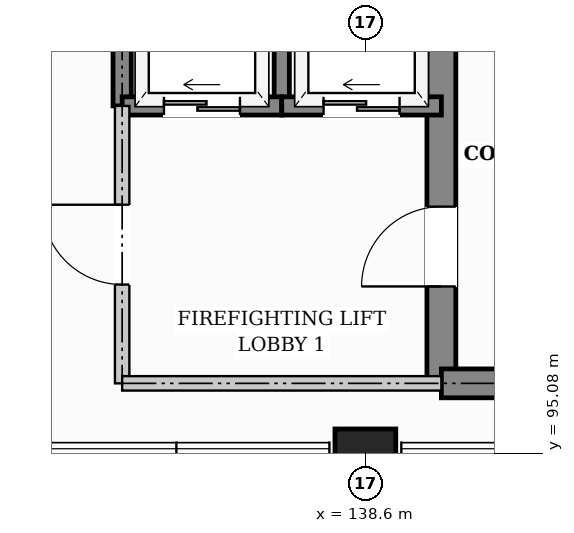
"""IFC4 building model, lengths in metres.
Left out: names, types, materials, properties, quantities, classifications, styles, units other than length and angle.
Written with IfcOpenShell. Run it as: python <this file> out.ifc"""

import sys

from ifc_helpers import new_model, si_unit, direction, frame, frame_2d, origin, origin_2d, place, context, subcontext, project, spatial, rectangle, extrude, element, fill, save


model = new_model("IFC4")
c1 = context("Model", 3, precision=1e-05, world=origin(), true_north=direction((0.0, 1.0)))
c2 = subcontext(c1, "Body", "Model", "MODEL_VIEW")
j1 = project(units=[si_unit("LENGTHUNIT", "METRE"), si_unit("PLANEANGLEUNIT", "RADIAN")], contexts=[c1])
p1 = place(None, origin())
s1 = spatial("IfcSite", under=j1, at=p1, CompositionType="ELEMENT")
p2 = place(p1, origin())
s2 = spatial("IfcBuilding", under=s1, at=p2, CompositionType="ELEMENT")
p3 = place(p2, frame((0.0, 0.0, 9.6)))
s3 = spatial("IfcBuildingStorey", under=s2, at=p3, CompositionType="ELEMENT", Elevation=9.6)
p4 = place(p3, frame((138.6, 95.0, 0.0), z_axis=(0.0, 0.0, 1.0), x_axis=(1.0, 0.0, 0.0)))
e1 = element("IfcColumn", 1, at=p4, inside=s3, PredefinedType="COLUMN", context=c2, shape_type="SweptSolid", body=[
    extrude(rectangle(XDim=0.8, YDim=0.8, at=origin_2d()), origin(), (0.0, 0.0, 1.0), 3.6),
])
p5 = place(p3, frame((139.6, 96.0, 0.0), z_axis=(0.0, 0.0, 1.0), x_axis=(0.0, 1.0, 0.0)))
e2 = element("IfcWall", 2, at=p5, inside=s3, PredefinedType="SHEAR", context=c2, shape_type="SweptSolid", body=[
    extrude(rectangle(XDim=6.0, YDim=0.38, at=frame_2d((3.0, 0.0))), origin(), (0.0, 0.0, 1.0), 3.32),
])
p6 = place(p5, frame((1.275, 0.0, 0.0)))
e3 = element("IfcOpeningElement", 3, at=p6, cuts=e2, PredefinedType="OPENING", context=c2, shape_type="SweptSolid", body=[
    extrude(rectangle(XDim=1.05, YDim=2.15, at=frame_2d((0.525, 1.075))), frame((0.0, 0.2, 0.0), z_axis=(0.0, -1.0, 0.0), x_axis=(1.0, 0.0, 0.0)), (0.0, 0.0, 1.0), 0.4),
])
p7 = place(p3, frame((139.6, 96.0, 0.0), z_axis=(0.0, 0.0, 1.0), x_axis=(1.0, 0.0, 0.0)))
e4 = element("IfcWall", 4, at=p7, inside=s3, PredefinedType="SHEAR", context=c2, shape_type="SweptSolid", body=[
    extrude(rectangle(XDim=7.0, YDim=0.38, at=frame_2d((3.5, 0.0))), origin(), (0.0, 0.0, 1.0), 3.32),
])
p8 = place(p3, frame((135.4, 99.65, 0.0), z_axis=(0.0, 0.0, 1.0), x_axis=(0.0, 1.0, 0.0)))
e5 = element("IfcWall", 5, at=p8, inside=s3, PredefinedType="SHEAR", context=c2, shape_type="SweptSolid", body=[
    extrude(rectangle(XDim=2.35, YDim=0.24, at=frame_2d((1.175, 0.0))), origin(), (0.0, 0.0, 1.0), 3.32),
])
p9 = place(p3, frame((137.5, 99.65, 0.0), z_axis=(0.0, 0.0, 1.0), x_axis=(0.0, 1.0, 0.0)))
e6 = element("IfcWall", 6, at=p9, inside=s3, PredefinedType="SHEAR", context=c2, shape_type="SweptSolid", body=[
    extrude(rectangle(XDim=2.35, YDim=0.2, at=frame_2d((1.175, 0.0))), origin(), (0.0, 0.0, 1.0), 3.32),
])
p10 = place(p3, frame((135.4, 99.65, 0.0), z_axis=(0.0, 0.0, 1.0), x_axis=(1.0, 0.0, 0.0)))
e7 = element("IfcWall", 7, at=p10, inside=s3, PredefinedType="SHEAR", context=c2, shape_type="SweptSolid", body=[
    extrude(rectangle(XDim=2.1, YDim=0.24, at=frame_2d((1.05, 0.0))), origin(), (0.0, 0.0, 1.0), 3.32),
])
p11 = place(p10, frame((0.55, 0.0, 0.0)))
e8 = element("IfcOpeningElement", 8, at=p11, cuts=e7, PredefinedType="OPENING", context=c2, shape_type="SweptSolid", body=[
    extrude(rectangle(XDim=1.0, YDim=2.1, at=frame_2d((0.5, 1.05))), frame((0.0, 0.13, 0.0), z_axis=(0.0, -1.0, 0.0), x_axis=(1.0, 0.0, 0.0)), (0.0, 0.0, 1.0), 0.26),
])
p12 = place(p3, frame((137.5, 99.65, 0.0), z_axis=(0.0, 0.0, 1.0), x_axis=(1.0, 0.0, 0.0)))
e9 = element("IfcWall", 9, at=p12, inside=s3, PredefinedType="SHEAR", context=c2, shape_type="SweptSolid", body=[
    extrude(rectangle(XDim=2.1, YDim=0.24, at=frame_2d((1.05, 0.0))), origin(), (0.0, 0.0, 1.0), 3.32),
])
p13 = place(p12, frame((0.55, 0.0, 0.0)))
e10 = element("IfcOpeningElement", 10, at=p13, cuts=e9, PredefinedType="OPENING", context=c2, shape_type="SweptSolid", body=[
    extrude(rectangle(XDim=1.0, YDim=2.1, at=frame_2d((0.5, 1.05))), frame((0.0, 0.13, 0.0), z_axis=(0.0, -1.0, 0.0), x_axis=(1.0, 0.0, 0.0)), (0.0, 0.0, 1.0), 0.26),
])
p14 = place(p3, frame((135.4, 96.0, 0.0), z_axis=(0.0, 0.0, 1.0), x_axis=(0.0, 1.0, 0.0)))
e11 = element("IfcWall", 11, at=p14, inside=s3, PredefinedType="PARTITIONING", context=c2, shape_type="SweptSolid", body=[
    extrude(rectangle(XDim=3.65, YDim=0.19, at=frame_2d((1.825, 0.0))), origin(), (0.0, 0.0, 1.0), 3.32),
])
p15 = place(p14, frame((1.3, 0.0, 0.0)))
e12 = element("IfcOpeningElement", 12, at=p15, cuts=e11, PredefinedType="OPENING", context=c2, shape_type="SweptSolid", body=[
    extrude(rectangle(XDim=1.05, YDim=2.15, at=frame_2d((0.525, 1.075))), frame((0.0, 0.105, 0.0), z_axis=(0.0, -1.0, 0.0), x_axis=(1.0, 0.0, 0.0)), (0.0, 0.0, 1.0), 0.21),
])
p16 = place(p3, frame((135.4, 96.0, 0.0), z_axis=(0.0, 0.0, 1.0), x_axis=(1.0, 0.0, 0.0)))
e13 = element("IfcWall", 13, at=p16, inside=s3, PredefinedType="PARTITIONING", context=c2, shape_type="SweptSolid", body=[
    extrude(rectangle(XDim=4.2, YDim=0.19, at=frame_2d((2.1, 0.0))), origin(), (0.0, 0.0, 1.0), 3.32),
])
p17 = place(p6, origin())
e14 = element("IfcDoor", 14, at=p17, inside=s3, OperationType="SINGLE_SWING_LEFT", PredefinedType="DOOR", context=c2, shape_type="SweptSolid", body=[
    extrude(rectangle(XDim=1.05, YDim=2.15, at=frame_2d((0.525, 1.075))), frame((0.0, 0.025, 0.0), z_axis=(0.0, -1.0, 0.0), x_axis=(1.0, 0.0, 0.0)), (0.0, 0.0, 1.0), 0.05),
])
fill(e3, e14)
p18 = place(p11, origin())
e15 = element("IfcDoor", 15, at=p18, inside=s3, OperationType="SLIDING_TO_LEFT", PredefinedType="DOOR", context=c2, shape_type="SweptSolid", body=[
    extrude(rectangle(XDim=1.0, YDim=2.1, at=frame_2d((0.5, 1.05))), frame((0.0, 0.025, 0.0), z_axis=(0.0, -1.0, 0.0), x_axis=(1.0, 0.0, 0.0)), (0.0, 0.0, 1.0), 0.05),
])
fill(e8, e15)
p19 = place(p13, origin())
e16 = element("IfcDoor", 16, at=p19, inside=s3, OperationType="SLIDING_TO_LEFT", PredefinedType="DOOR", context=c2, shape_type="SweptSolid", body=[
    extrude(rectangle(XDim=1.0, YDim=2.1, at=frame_2d((0.5, 1.05))), frame((0.0, 0.025, 0.0), z_axis=(0.0, -1.0, 0.0), x_axis=(1.0, 0.0, 0.0)), (0.0, 0.0, 1.0), 0.05),
])
fill(e10, e16)
p20 = place(p15, origin())
e17 = element("IfcDoor", 17, at=p20, inside=s3, OperationType="SINGLE_SWING_RIGHT", PredefinedType="DOOR", context=c2, shape_type="SweptSolid", body=[
    extrude(rectangle(XDim=1.05, YDim=2.15, at=frame_2d((0.525, 1.075))), frame((0.0, 0.025, 0.0), z_axis=(0.0, -1.0, 0.0), x_axis=(1.0, 0.0, 0.0)), (0.0, 0.0, 1.0), 0.05),
])
fill(e12, e17)
save(model, sys.argv[1])
